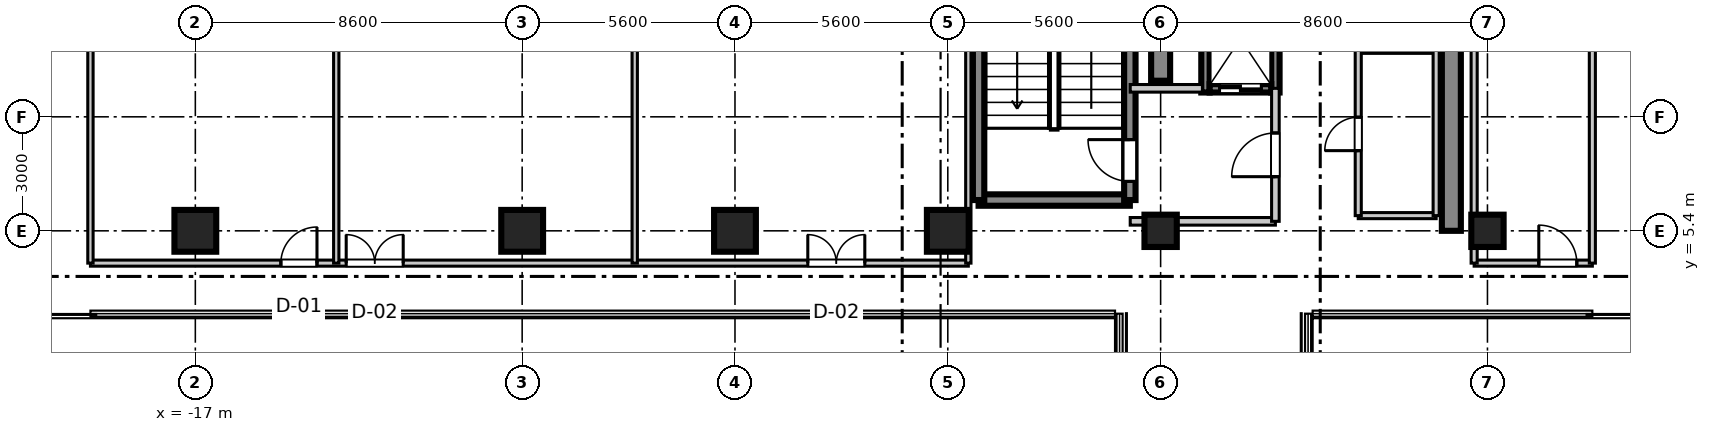
"""IFC4 building model, lengths in metres.
Left out: names, types, materials, properties, quantities, classifications, styles, units other than length and angle.
Written with IfcOpenShell. Run it as: python <this file> out.ifc"""

import sys

from ifc_helpers import new_model, si_unit, direction, frame, frame_2d, origin, origin_2d, place, context, subcontext, project, spatial, rectangle, extrude, source, transform, mapped, element, fill, save


model = new_model("IFC4")
c1 = context("Model", 3, precision=1e-05, world=origin(), true_north=direction((0.0, 1.0)))
c2 = subcontext(c1, "Body", "Model", "MODEL_VIEW")
j1 = project(units=[si_unit("LENGTHUNIT", "METRE"), si_unit("PLANEANGLEUNIT", "RADIAN")], contexts=[c1])
p1 = place(None, origin())
s1 = spatial("IfcSite", under=j1, at=p1, CompositionType="ELEMENT")
p2 = place(p1, origin())
s2 = spatial("IfcBuilding", under=s1, at=p2, CompositionType="ELEMENT")
p3 = place(p2, frame((0.0, 0.0, 163.6)))
s3 = spatial("IfcBuildingStorey", under=s2, at=p3, CompositionType="ELEMENT", Elevation=163.6)
m1 = source(origin(), c2, "Body", "SweptSolid", [
    extrude(rectangle(XDim=1.1, YDim=1.1, at=origin_2d()), origin(), (0.0, 0.0, 1.0), 3.605),
])
for number, where, z_axis, x_axis in (
    (1, (-17.0, 5.4, 0.0), (0.0, 0.0, 1.0), (1.0, 0.0, 0.0)),
    (2, (-8.4, 5.4, 0.0), (0.0, 0.0, 1.0), (1.0, 0.0, 0.0)),
    (3, (-2.8, 5.4, 0.0), (0.0, 0.0, 1.0), (1.0, 0.0, 0.0)),
    (4, (2.8, 5.4, 0.0), (0.0, 0.0, 1.0), (1.0, 0.0, 0.0)),
):
    element("IfcColumn", number, at=place(p3, frame(where, z_axis=z_axis, x_axis=x_axis)), inside=s3, PredefinedType="COLUMN", context=c2, shape_type="MappedRepresentation", body=[
        mapped(m1, transform((0.0, 0.0, 0.0), scale=1.0)),
    ])
m2 = source(origin(), c2, "Body", "SweptSolid", [
    extrude(rectangle(XDim=0.85, YDim=0.85, at=origin_2d()), origin(), (0.0, 0.0, 1.0), 3.605),
])
for number, where, z_axis, x_axis in (
    (5, (8.4, 5.4, 0.0), (0.0, 0.0, 1.0), (1.0, 0.0, 0.0)),
    (6, (17.0, 5.4, 0.0), (0.0, 0.0, 1.0), (1.0, 0.0, 0.0)),
):
    element("IfcColumn", number, at=place(p3, frame(where, z_axis=z_axis, x_axis=x_axis)), inside=s3, PredefinedType="PILASTER", context=c2, shape_type="MappedRepresentation", body=[
        mapped(m2, transform((0.0, 0.0, 0.0), scale=1.0)),
    ])
m3 = source(origin(), c2, "Body", "SweptSolid", [
    extrude(rectangle(XDim=7.65, YDim=0.5, at=frame_2d((3.825, 0.0))), origin(), (0.0, 0.0, 1.0), 3.39),
])
p4 = place(p3, frame((8.4, 9.35, 0.0), z_axis=(0.0, 0.0, 1.0), x_axis=(0.0, 1.0, 0.0)))
e7 = element("IfcWall", 7, at=p4, inside=s3, PredefinedType="SHEAR", context=c2, shape_type="MappedRepresentation", body=[
    mapped(m3, transform((0.0, 0.0, 0.0), scale=1.0)),
])
m4 = source(origin(), c2, "Body", "SweptSolid", [
    extrude(rectangle(XDim=11.6, YDim=0.5, at=frame_2d((5.8, 0.0))), origin(), (0.0, 0.0, 1.0), 3.39),
])
p5 = place(p3, frame((16.05, 5.4, 0.0), z_axis=(0.0, 0.0, 1.0), x_axis=(0.0, 1.0, 0.0)))
e8 = element("IfcWall", 8, at=p5, inside=s3, PredefinedType="SHEAR", context=c2, shape_type="MappedRepresentation", body=[
    mapped(m4, transform((0.0, 0.0, 0.0), scale=1.0)),
])
m5 = source(origin(), c2, "Body", "SweptSolid", [
    extrude(rectangle(XDim=3.98, YDim=0.3, at=frame_2d((1.99, 0.0))), origin(), (0.0, 0.0, 1.0), 3.39),
])
p6 = place(p3, frame((3.61, 6.21, 0.0), z_axis=(0.0, 0.0, 1.0), x_axis=(1.0, 0.0, 0.0)))
e9 = element("IfcWall", 9, at=p6, inside=s3, PredefinedType="SHEAR", context=c2, shape_type="MappedRepresentation", body=[
    mapped(m5, transform((0.0, 0.0, 0.0), scale=1.0)),
])
m6 = source(origin(), c2, "Body", "SweptSolid", [
    extrude(rectangle(XDim=9.38, YDim=0.3, at=frame_2d((4.69, 0.0))), origin(), (0.0, 0.0, 1.0), 3.39),
])
p7 = place(p3, frame((3.61, 6.21, 0.0), z_axis=(0.0, 0.0, 1.0), x_axis=(0.0, 1.0, 0.0)))
e10 = element("IfcWall", 10, at=p7, inside=s3, PredefinedType="SHEAR", context=c2, shape_type="MappedRepresentation", body=[
    mapped(m6, transform((0.0, 0.0, 0.0), scale=1.0)),
])
p8 = place(p3, frame((7.59, 6.21, 0.0), z_axis=(0.0, 0.0, 1.0), x_axis=(0.0, 1.0, 0.0)))
e11 = element("IfcWall", 11, at=p8, inside=s3, PredefinedType="SHEAR", context=c2, shape_type="MappedRepresentation", body=[
    mapped(m6, transform((0.0, 0.0, 0.0), scale=1.0)),
])
p9 = place(p8, frame((0.49, 0.0, 0.0)))
e12 = element("IfcOpeningElement", 12, at=p9, cuts=e11, PredefinedType="OPENING", context=c2, shape_type="SweptSolid", body=[
    extrude(rectangle(XDim=1.1, YDim=2.15, at=frame_2d((0.55, 1.075))), frame((0.0, 0.16, 0.0), z_axis=(0.0, -1.0, 0.0), x_axis=(1.0, 0.0, 0.0)), (0.0, 0.0, 1.0), 0.32),
])
m7 = source(origin(), c2, "Body", "SweptSolid", [
    extrude(rectangle(XDim=2.82, YDim=0.22, at=frame_2d((1.41, 0.0))), origin(), (0.0, 0.0, 1.0), 3.39),
])
for number, where, z_axis, x_axis in (
    (13, (9.58, 9.04, 0.0), (0.0, 0.0, 1.0), (0.0, 1.0, 0.0)),
    (14, (11.42, 9.04, 0.0), (0.0, 0.0, 1.0), (0.0, 1.0, 0.0)),
):
    element("IfcWall", number, at=place(p3, frame(where, z_axis=z_axis, x_axis=x_axis)), inside=s3, PredefinedType="SHEAR", context=c2, shape_type="MappedRepresentation", body=[
        mapped(m7, transform((0.0, 0.0, 0.0), scale=1.0)),
    ])
m8 = source(origin(), c2, "Body", "SweptSolid", [
    extrude(rectangle(XDim=1.62, YDim=0.22, at=frame_2d((0.81, 0.0))), origin(), (0.0, 0.0, 1.0), 3.39),
])
p10 = place(p3, frame((9.69, 9.15, 0.0), z_axis=(0.0, 0.0, 1.0), x_axis=(1.0, 0.0, 0.0)))
e15 = element("IfcWall", 15, at=p10, inside=s3, PredefinedType="SHEAR", context=c2, shape_type="MappedRepresentation", body=[
    mapped(m8, transform((0.0, 0.0, 0.0), scale=1.0)),
])
p11 = place(p10, frame((0.26, 0.0, 0.0)))
e16 = element("IfcOpeningElement", 16, at=p11, cuts=e15, PredefinedType="OPENING", context=c2, shape_type="SweptSolid", body=[
    extrude(rectangle(XDim=1.1, YDim=2.2, at=frame_2d((0.55, 1.1))), frame((0.0, 0.12, 0.0), z_axis=(0.0, -1.0, 0.0), x_axis=(1.0, 0.0, 0.0)), (0.0, 0.0, 1.0), 0.24),
])
m9 = source(origin(), c2, "Body", "SweptSolid", [
    extrude(rectangle(XDim=3.82, YDim=0.2, at=frame_2d((1.91, 0.0))), origin(), (0.0, 0.0, 1.0), 2.73),
])
p12 = place(p3, frame((7.6, 5.65, 0.0), z_axis=(0.0, 0.0, 1.0), x_axis=(1.0, 0.0, 0.0)))
e17 = element("IfcWall", 17, at=p12, inside=s3, PredefinedType="PARTITIONING", context=c2, shape_type="MappedRepresentation", body=[
    mapped(m9, transform((0.0, 0.0, 0.0), scale=1.0)),
])
m10 = source(origin(), c2, "Body", "SweptSolid", [
    extrude(rectangle(XDim=1.9, YDim=0.2, at=frame_2d((0.95, 0.0))), origin(), (0.0, 0.0, 1.0), 2.73),
])
p13 = place(p3, frame((7.6, 9.15, 0.0), z_axis=(0.0, 0.0, 1.0), x_axis=(1.0, 0.0, 0.0)))
e18 = element("IfcWall", 18, at=p13, inside=s3, PredefinedType="PARTITIONING", context=c2, shape_type="MappedRepresentation", body=[
    mapped(m10, transform((0.0, 0.0, 0.0), scale=1.0)),
])
m11 = source(origin(), c2, "Body", "SweptSolid", [
    extrude(rectangle(XDim=3.5, YDim=0.2, at=frame_2d((1.75, 0.0))), origin(), (0.0, 0.0, 1.0), 2.73),
])
p14 = place(p3, frame((11.42, 5.65, 0.0), z_axis=(0.0, 0.0, 1.0), x_axis=(0.0, 1.0, 0.0)))
e19 = element("IfcWall", 19, at=p14, inside=s3, PredefinedType="PARTITIONING", context=c2, shape_type="MappedRepresentation", body=[
    mapped(m11, transform((0.0, 0.0, 0.0), scale=1.0)),
])
p15 = place(p14, frame((1.175, 0.0, 0.0)))
e20 = element("IfcOpeningElement", 20, at=p15, cuts=e19, PredefinedType="OPENING", context=c2, shape_type="SweptSolid", body=[
    extrude(rectangle(XDim=1.15, YDim=2.15, at=frame_2d((0.575, 1.075))), frame((0.0, 0.11, 0.0), z_axis=(0.0, -1.0, 0.0), x_axis=(1.0, 0.0, 0.0)), (0.0, 0.0, 1.0), 0.22),
])
m12 = source(origin(), c2, "Body", "SweptSolid", [
    extrude(rectangle(XDim=2.05, YDim=0.16, at=frame_2d((1.025, 0.0))), origin(), (0.0, 0.0, 1.0), 2.73),
])
for number, where, z_axis, x_axis in (
    (21, (13.6, 5.8, 0.0), (0.0, 0.0, 1.0), (1.0, 0.0, 0.0)),
    (22, (13.6, 10.15, 0.0), (0.0, 0.0, 1.0), (1.0, 0.0, 0.0)),
):
    element("IfcWall", number, at=place(p3, frame(where, z_axis=z_axis, x_axis=x_axis)), inside=s3, PredefinedType="PARTITIONING", context=c2, shape_type="MappedRepresentation", body=[
        mapped(m12, transform((0.0, 0.0, 0.0), scale=1.0)),
    ])
m13 = source(origin(), c2, "Body", "SweptSolid", [
    extrude(rectangle(XDim=4.35, YDim=0.16, at=frame_2d((2.175, 0.0))), origin(), (0.0, 0.0, 1.0), 2.73),
])
p16 = place(p3, frame((13.6, 5.8, 0.0), z_axis=(0.0, 0.0, 1.0), x_axis=(0.0, 1.0, 0.0)))
e23 = element("IfcWall", 23, at=p16, inside=s3, PredefinedType="PARTITIONING", context=c2, shape_type="MappedRepresentation", body=[
    mapped(m13, transform((0.0, 0.0, 0.0), scale=1.0)),
])
p17 = place(p16, frame((1.71, 0.0, 0.0)))
e24 = element("IfcOpeningElement", 24, at=p17, cuts=e23, PredefinedType="OPENING", context=c2, shape_type="SweptSolid", body=[
    extrude(rectangle(XDim=0.88, YDim=2.1, at=frame_2d((0.44, 1.05))), frame((0.0, 0.09, 0.0), z_axis=(0.0, -1.0, 0.0), x_axis=(1.0, 0.0, 0.0)), (0.0, 0.0, 1.0), 0.18),
])
p18 = place(p3, frame((15.65, 5.8, 0.0), z_axis=(0.0, 0.0, 1.0), x_axis=(0.0, 1.0, 0.0)))
e25 = element("IfcWall", 25, at=p18, inside=s3, PredefinedType="PARTITIONING", context=c2, shape_type="MappedRepresentation", body=[
    mapped(m13, transform((0.0, 0.0, 0.0), scale=1.0)),
])
m14 = source(origin(), c2, "Body", "SweptSolid", [
    extrude(rectangle(XDim=3.11, YDim=0.16, at=frame_2d((1.555, 0.0))), origin(), (0.0, 0.0, 1.0), 2.73),
])
p19 = place(p3, frame((16.65, 4.55, 0.0), z_axis=(0.0, 0.0, 1.0), x_axis=(1.0, 0.0, 0.0)))
e26 = element("IfcWall", 26, at=p19, inside=s3, PredefinedType="PARTITIONING", context=c2, shape_type="MappedRepresentation", body=[
    mapped(m14, transform((0.0, 0.0, 0.0), scale=1.0)),
])
p20 = place(p19, frame((1.701, 0.0, 0.0)))
e27 = element("IfcOpeningElement", 27, at=p20, cuts=e26, PredefinedType="OPENING", context=c2, shape_type="SweptSolid", body=[
    extrude(rectangle(XDim=1.0, YDim=2.1, at=frame_2d((0.5, 1.05))), frame((0.0, 0.09, 0.0), z_axis=(0.0, -1.0, 0.0), x_axis=(1.0, 0.0, 0.0)), (0.0, 0.0, 1.0), 0.18),
])
m15 = source(origin(), c2, "Body", "SweptSolid", [
    extrude(rectangle(XDim=17.95, YDim=0.16, at=frame_2d((8.975, 0.0))), origin(), (0.0, 0.0, 1.0), 2.73),
])
p21 = place(p3, frame((16.65, 4.55, 0.0), z_axis=(0.0, 0.0, 1.0), x_axis=(0.0, 1.0, 0.0)))
e28 = element("IfcWall", 28, at=p21, inside=s3, PredefinedType="PARTITIONING", context=c2, shape_type="MappedRepresentation", body=[
    mapped(m15, transform((0.0, 0.0, 0.0), scale=1.0)),
])
m16 = source(origin(), c2, "Body", "SweptSolid", [
    extrude(rectangle(XDim=16.53, YDim=0.16, at=frame_2d((8.265, 0.0))), origin(), (0.0, 0.0, 1.0), 2.73),
])
p22 = place(p3, frame((19.76, 4.55, 0.0), z_axis=(0.0, 0.0, 1.0), x_axis=(0.0, 1.0, 0.0)))
e29 = element("IfcWall", 29, at=p22, inside=s3, PredefinedType="PARTITIONING", context=c2, shape_type="MappedRepresentation", body=[
    mapped(m16, transform((0.0, 0.0, 0.0), scale=1.0)),
])
m17 = source(origin(), c2, "Body", "SweptSolid", [
    extrude(rectangle(XDim=23.1, YDim=0.16, at=frame_2d((11.55, 0.0))), origin(), (0.0, 0.0, 1.0), 2.73),
])
p23 = place(p3, frame((-19.76, 4.55, 0.0), z_axis=(0.0, 0.0, 1.0), x_axis=(1.0, 0.0, 0.0)))
e30 = element("IfcWall", 30, at=p23, inside=s3, PredefinedType="PARTITIONING", context=c2, shape_type="MappedRepresentation", body=[
    mapped(m17, transform((0.0, 0.0, 0.0), scale=1.0)),
])
p24 = place(p23, frame((5.011, 0.0, 0.0)))
e31 = element("IfcOpeningElement", 31, at=p24, cuts=e30, PredefinedType="OPENING", context=c2, shape_type="SweptSolid", body=[
    extrude(rectangle(XDim=0.95, YDim=2.1, at=frame_2d((0.475, 1.05))), frame((0.0, 0.09, 0.0), z_axis=(0.0, -1.0, 0.0), x_axis=(1.0, 0.0, 0.0)), (0.0, 0.0, 1.0), 0.18),
])
p25 = place(p23, frame((6.73, 0.0, 0.0)))
e32 = element("IfcOpeningElement", 32, at=p25, cuts=e30, PredefinedType="OPENING", context=c2, shape_type="SweptSolid", body=[
    extrude(rectangle(XDim=1.5, YDim=2.15, at=frame_2d((0.75, 1.075))), frame((0.0, 0.09, 0.0), z_axis=(0.0, -1.0, 0.0), x_axis=(1.0, 0.0, 0.0)), (0.0, 0.0, 1.0), 0.18),
])
p26 = place(p23, frame((18.876, 0.0, 0.0)))
e33 = element("IfcOpeningElement", 33, at=p26, cuts=e30, PredefinedType="OPENING", context=c2, shape_type="SweptSolid", body=[
    extrude(rectangle(XDim=1.5, YDim=2.15, at=frame_2d((0.75, 1.075))), frame((0.0, 0.09, 0.0), z_axis=(0.0, -1.0, 0.0), x_axis=(1.0, 0.0, 0.0)), (0.0, 0.0, 1.0), 0.18),
])
m18 = source(origin(), c2, "Body", "SweptSolid", [
    extrude(rectangle(XDim=16.53, YDim=0.14, at=frame_2d((8.265, 0.0))), origin(), (0.0, 0.0, 1.0), 2.73),
])
p27 = place(p3, frame((-19.76, 4.55, 0.0), z_axis=(0.0, 0.0, 1.0), x_axis=(0.0, 1.0, 0.0)))
e34 = element("IfcWall", 34, at=p27, inside=s3, PredefinedType="PARTITIONING", context=c2, shape_type="MappedRepresentation", body=[
    mapped(m18, transform((0.0, 0.0, 0.0), scale=1.0)),
])
m19 = source(origin(), c2, "Body", "SweptSolid", [
    extrude(rectangle(XDim=17.95, YDim=0.14, at=frame_2d((8.975, 0.0))), origin(), (0.0, 0.0, 1.0), 2.73),
])
for number, where, z_axis, x_axis in (
    (35, (3.34, 4.55, 0.0), (0.0, 0.0, 1.0), (0.0, 1.0, 0.0)),
    (36, (-13.292, 4.55, 0.0), (0.0, 0.0, 1.0), (0.0, 1.0, 0.0)),
    (37, (-5.438, 4.55, 0.0), (0.0, 0.0, 1.0), (0.0, 1.0, 0.0)),
):
    element("IfcWall", number, at=place(p3, frame(where, z_axis=z_axis, x_axis=x_axis)), inside=s3, PredefinedType="PARTITIONING", context=c2, shape_type="MappedRepresentation", body=[
        mapped(m19, transform((0.0, 0.0, 0.0), scale=1.0)),
    ])
m20 = source(origin(), c2, "Body", "SweptSolid", [
    extrude(rectangle(XDim=1.1, YDim=2.15, at=frame_2d((0.55, 1.075))), frame((0.0, 0.025, 0.0), z_axis=(0.0, -1.0, 0.0), x_axis=(1.0, 0.0, 0.0)), (0.0, 0.0, 1.0), 0.05),
])
p28 = place(p9, origin())
e38 = element("IfcDoor", 38, at=p28, inside=s3, OperationType="SINGLE_SWING_RIGHT", PredefinedType="DOOR", context=c2, shape_type="MappedRepresentation", body=[
    mapped(m20, transform((0.0, 0.0, 0.0), scale=1.0)),
])
fill(e12, e38)
m21 = source(origin(), c2, "Body", "SweptSolid", [
    extrude(rectangle(XDim=1.1, YDim=2.2, at=frame_2d((0.55, 1.1))), frame((0.0, 0.025, 0.0), z_axis=(0.0, -1.0, 0.0), x_axis=(1.0, 0.0, 0.0)), (0.0, 0.0, 1.0), 0.05),
])
p29 = place(p11, frame((1.1, 0.0, 0.0), z_axis=(0.0, 0.0, 1.0), x_axis=(-1.0, 0.0, 0.0)))
e39 = element("IfcDoor", 39, at=p29, inside=s3, OperationType="DOUBLE_DOOR_SLIDING", PredefinedType="DOOR", context=c2, shape_type="MappedRepresentation", body=[
    mapped(m21, transform((0.0, 0.0, 0.0), scale=1.0)),
])
fill(e16, e39)
m22 = source(origin(), c2, "Body", "SweptSolid", [
    extrude(rectangle(XDim=1.15, YDim=2.15, at=frame_2d((0.575, 1.075))), frame((0.0, 0.025, 0.0), z_axis=(0.0, -1.0, 0.0), x_axis=(1.0, 0.0, 0.0)), (0.0, 0.0, 1.0), 0.05),
])
p30 = place(p15, frame((1.15, 0.0, 0.0), z_axis=(0.0, 0.0, 1.0), x_axis=(-1.0, 0.0, 0.0)))
e40 = element("IfcDoor", 40, at=p30, inside=s3, OperationType="SINGLE_SWING_LEFT", PredefinedType="DOOR", context=c2, shape_type="MappedRepresentation", body=[
    mapped(m22, transform((0.0, 0.0, 0.0), scale=1.0)),
])
fill(e20, e40)
m23 = source(origin(), c2, "Body", "SweptSolid", [
    extrude(rectangle(XDim=0.88, YDim=2.1, at=frame_2d((0.44, 1.05))), frame((0.0, 0.025, 0.0), z_axis=(0.0, -1.0, 0.0), x_axis=(1.0, 0.0, 0.0)), (0.0, 0.0, 1.0), 0.05),
])
p31 = place(p17, frame((0.88, 0.0, 0.0), z_axis=(0.0, 0.0, 1.0), x_axis=(-1.0, 0.0, 0.0)))
e41 = element("IfcDoor", 41, at=p31, inside=s3, OperationType="SINGLE_SWING_LEFT", PredefinedType="DOOR", context=c2, shape_type="MappedRepresentation", body=[
    mapped(m23, transform((0.0, 0.0, 0.0), scale=1.0)),
])
fill(e24, e41)
m24 = source(origin(), c2, "Body", "SweptSolid", [
    extrude(rectangle(XDim=1.0, YDim=2.1, at=frame_2d((0.5, 1.05))), frame((0.0, 0.025, 0.0), z_axis=(0.0, -1.0, 0.0), x_axis=(1.0, 0.0, 0.0)), (0.0, 0.0, 1.0), 0.05),
])
p32 = place(p20, origin())
e42 = element("IfcDoor", 42, at=p32, inside=s3, OperationType="SINGLE_SWING_LEFT", PredefinedType="DOOR", context=c2, shape_type="MappedRepresentation", body=[
    mapped(m24, transform((0.0, 0.0, 0.0), scale=1.0)),
])
fill(e27, e42)
m25 = source(origin(), c2, "Body", "SweptSolid", [
    extrude(rectangle(XDim=0.95, YDim=2.1, at=frame_2d((0.475, 1.05))), frame((0.0, 0.025, 0.0), z_axis=(0.0, -1.0, 0.0), x_axis=(1.0, 0.0, 0.0)), (0.0, 0.0, 1.0), 0.05),
])
p33 = place(p24, origin())
e43 = element("IfcDoor", 43, at=p33, inside=s3, OperationType="SINGLE_SWING_RIGHT", PredefinedType="DOOR", context=c2, shape_type="MappedRepresentation", body=[
    mapped(m25, transform((0.0, 0.0, 0.0), scale=1.0)),
])
fill(e31, e43)
m26 = source(origin(), c2, "Body", "SweptSolid", [
    extrude(rectangle(XDim=1.5, YDim=2.15, at=frame_2d((0.75, 1.075))), frame((0.0, 0.025, 0.0), z_axis=(0.0, -1.0, 0.0), x_axis=(1.0, 0.0, 0.0)), (0.0, 0.0, 1.0), 0.05),
])
p34 = place(p25, origin())
e44 = element("IfcDoor", 44, at=p34, inside=s3, OperationType="DOUBLE_DOOR_SINGLE_SWING", PredefinedType="DOOR", context=c2, shape_type="MappedRepresentation", body=[
    mapped(m26, transform((0.0, 0.0, 0.0), scale=1.0)),
])
fill(e32, e44)
p35 = place(p26, origin())
e45 = element("IfcDoor", 45, at=p35, inside=s3, OperationType="DOUBLE_DOOR_SINGLE_SWING", PredefinedType="DOOR", context=c2, shape_type="MappedRepresentation", body=[
    mapped(m26, transform((0.0, 0.0, 0.0), scale=1.0)),
])
fill(e33, e45)
save(model, sys.argv[1])
